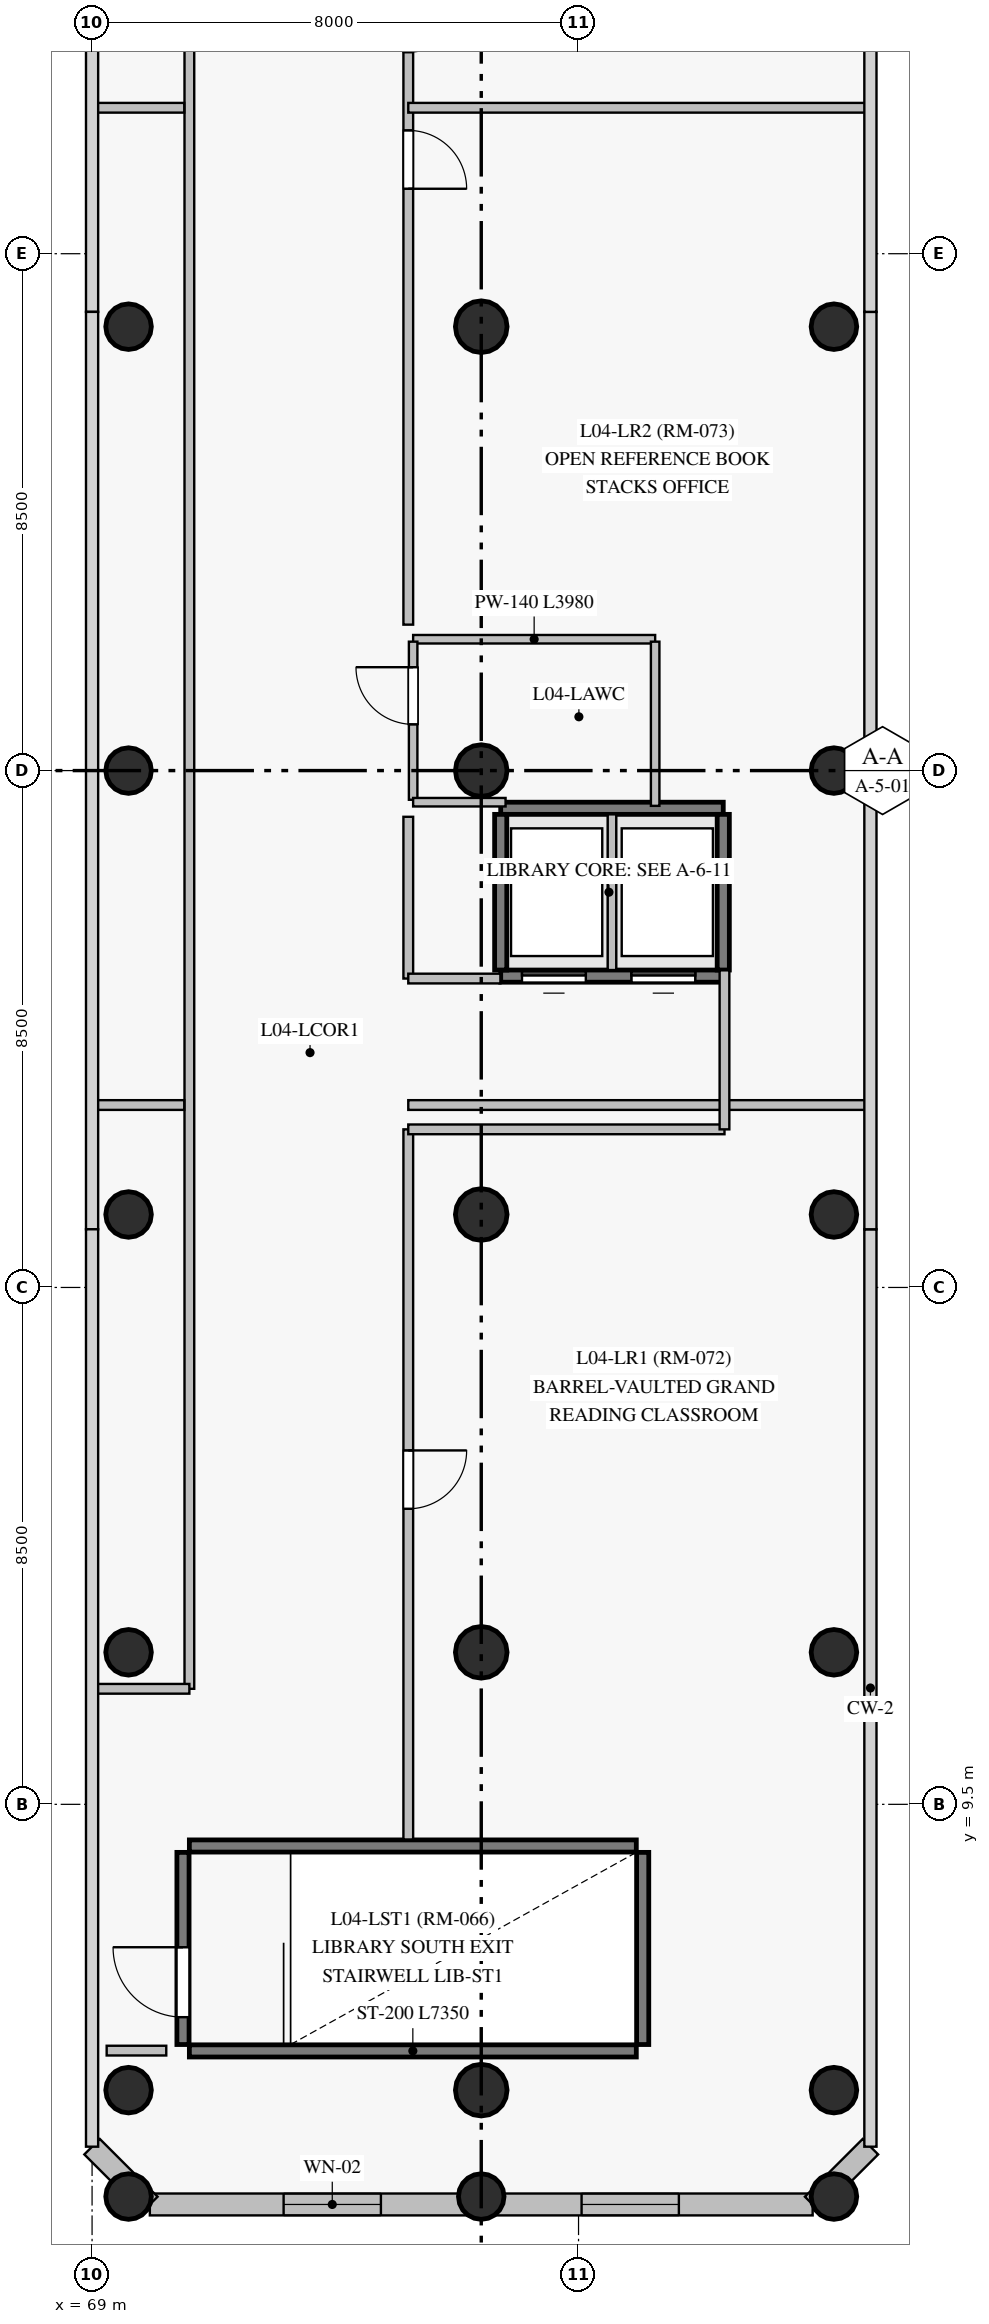
"""IFC4 building model, lengths in metres.
Left out: names, types, materials, properties, quantities, classifications, styles, units other than length and angle.
Written with IfcOpenShell. Run it as: python <this file> out.ifc"""

import sys

from ifc_helpers import new_model, si_unit, direction, frame, frame_2d, origin, origin_with_axes, origin_2d, place, context, subcontext, project, spatial, rectangle, circle, extrude, source, transform, mapped, element, fill, save


model = new_model("IFC4")
c1 = context("Model", 3, precision=1e-05, world=origin(), true_north=direction((0.0, 1.0)))
c2 = subcontext(c1, "Body", "Model", "MODEL_VIEW")
j1 = project(units=[si_unit("LENGTHUNIT", "METRE"), si_unit("PLANEANGLEUNIT", "RADIAN")], contexts=[c1])
p1 = place(None, origin())
s1 = spatial("IfcSite", under=j1, at=p1, CompositionType="ELEMENT")
p2 = place(p1, origin())
s2 = spatial("IfcBuilding", under=s1, at=p2, CompositionType="ELEMENT")
p3 = place(p2, frame((0.0, 0.0, 18.0)))
s3 = spatial("IfcBuildingStorey", under=s2, at=p3, CompositionType="ELEMENT", Elevation=18.0)
m1 = source(origin_with_axes(), c2, "Body", "SweptSolid", [
    extrude(circle(Radius=0.375, at=origin_2d()), origin(), (0.0, 0.0, 1.0), 4.225),
])
for number, where, z_axis, x_axis in (
    (1, (69.6, 3.05, 0.0), (0.0, 0.0, 1.0), (1.0, 0.0, 0.0)),
    (2, (75.4, 3.05, 0.0), (0.0, 0.0, 1.0), (1.0, 0.0, 0.0)),
    (3, (81.2, 3.05, 0.0), (0.0, 0.0, 1.0), (1.0, 0.0, 0.0)),
    (4, (69.6, 4.8, 0.0), (0.0, 0.0, 1.0), (1.0, 0.0, 0.0)),
    (5, (69.6, 12.0, 0.0), (0.0, 0.0, 1.0), (1.0, 0.0, 0.0)),
    (6, (69.6, 19.2, 0.0), (0.0, 0.0, 1.0), (1.0, 0.0, 0.0)),
    (7, (69.6, 26.5, 0.0), (0.0, 0.0, 1.0), (1.0, 0.0, 0.0)),
    (8, (69.6, 33.8, 0.0), (0.0, 0.0, 1.0), (1.0, 0.0, 0.0)),
):
    element("IfcColumn", number, at=place(p3, frame(where, z_axis=z_axis, x_axis=x_axis)), inside=s3, PredefinedType="COLUMN", context=c2, shape_type="MappedRepresentation", body=[
        mapped(m1, transform((0.0, 0.0, 0.0), scale=1.0)),
    ])
m2 = source(origin_with_axes(), c2, "Body", "SweptSolid", [
    extrude(circle(Radius=0.425, at=origin_2d()), origin(), (0.0, 0.0, 1.0), 4.225),
])
for number, where, z_axis, x_axis in (
    (9, (75.4, 4.8, 0.0), (0.0, 0.0, 1.0), (1.0, 0.0, 0.0)),
    (10, (75.4, 12.0, 0.0), (0.0, 0.0, 1.0), (1.0, 0.0, 0.0)),
    (11, (75.4, 19.2, 0.0), (0.0, 0.0, 1.0), (1.0, 0.0, 0.0)),
    (12, (75.4, 26.5, 0.0), (0.0, 0.0, 1.0), (1.0, 0.0, 0.0)),
    (13, (75.4, 33.8, 0.0), (0.0, 0.0, 1.0), (1.0, 0.0, 0.0)),
):
    element("IfcColumn", number, at=place(p3, frame(where, z_axis=z_axis, x_axis=x_axis)), inside=s3, PredefinedType="COLUMN", context=c2, shape_type="MappedRepresentation", body=[
        mapped(m2, transform((0.0, 0.0, 0.0), scale=1.0)),
    ])
for number, where, z_axis, x_axis in (
    (14, (81.2, 4.8, 0.0), (0.0, 0.0, 1.0), (1.0, 0.0, 0.0)),
    (15, (81.2, 12.0, 0.0), (0.0, 0.0, 1.0), (1.0, 0.0, 0.0)),
    (16, (81.2, 19.2, 0.0), (0.0, 0.0, 1.0), (1.0, 0.0, 0.0)),
    (17, (81.2, 26.5, 0.0), (0.0, 0.0, 1.0), (1.0, 0.0, 0.0)),
    (18, (81.2, 33.8, 0.0), (0.0, 0.0, 1.0), (1.0, 0.0, 0.0)),
):
    element("IfcColumn", number, at=place(p3, frame(where, z_axis=z_axis, x_axis=x_axis)), inside=s3, PredefinedType="COLUMN", context=c2, shape_type="MappedRepresentation", body=[
        mapped(m1, transform((0.0, 0.0, 0.0), scale=1.0)),
    ])
p4 = place(p3, frame((69.95, 2.92, 0.0), z_axis=(0.0, 0.0, 1.0), x_axis=(1.0, 0.0, 0.0)))
e19 = element("IfcWall", 19, at=p4, inside=s3, PredefinedType="SOLIDWALL", context=c2, shape_type="SweptSolid", body=[
    extrude(rectangle(XDim=10.9, YDim=0.36, at=frame_2d((5.45, 0.0))), origin(), (0.0, 0.0, 1.0), 4.225),
])
p5 = place(p4, frame((2.2, 0.0, 0.85)))
e20 = element("IfcOpeningElement", 20, at=p5, cuts=e19, PredefinedType="OPENING", context=c2, shape_type="SweptSolid", body=[
    extrude(rectangle(XDim=1.6, YDim=2.2, at=frame_2d((0.8, 1.1))), frame((0.0, 0.19, 0.0), z_axis=(0.0, -1.0, 0.0), x_axis=(1.0, 0.0, 0.0)), (0.0, 0.0, 1.0), 0.38),
])
p6 = place(p4, frame((7.1, 0.0, 0.85)))
e21 = element("IfcOpeningElement", 21, at=p6, cuts=e19, PredefinedType="OPENING", context=c2, shape_type="SweptSolid", body=[
    extrude(rectangle(XDim=1.6, YDim=2.2, at=frame_2d((0.8, 1.1))), frame((0.0, 0.19, 0.0), z_axis=(0.0, -1.0, 0.0), x_axis=(1.0, 0.0, 0.0)), (0.0, 0.0, 1.0), 0.38),
])
for number, where, z_axis, x_axis in (
    (22, (80.85, 2.92, 0.0), (0.0, 0.0, 1.0), (0.707, 0.707, 0.0)),
    (23, (69.0, 3.87, 0.0), (0.0, 0.0, 1.0), (0.707, -0.707, 0.0)),
):
    element("IfcWall", number, at=place(p3, frame(where, z_axis=z_axis, x_axis=x_axis)), inside=s3, PredefinedType="SOLIDWALL", context=c2, shape_type="SweptSolid", body=[
        extrude(rectangle(XDim=1.344, YDim=0.36, at=frame_2d((0.672, 0.0))), origin(), (0.0, 0.0, 1.0), 2.825),
    ])
for number, where, z_axis, x_axis in (
    (24, (70.6, 5.445, 0.0), (0.0, 0.0, 1.0), (1.0, 0.0, 0.0)),
    (25, (70.6, 8.815, 0.0), (0.0, 0.0, 1.0), (1.0, 0.0, 0.0)),
):
    element("IfcWall", number, at=place(p3, frame(where, z_axis=z_axis, x_axis=x_axis)), inside=s3, PredefinedType="SHEAR", context=c2, shape_type="SweptSolid", body=[
        extrude(rectangle(XDim=7.35, YDim=0.2, at=frame_2d((3.675, 0.0))), origin(), (0.0, 0.0, 1.0), 4.225),
    ])
p7 = place(p3, frame((75.72, 23.12, 0.0), z_axis=(0.0, 0.0, 1.0), x_axis=(1.0, 0.0, 0.0)))
e26 = element("IfcWall", 26, at=p7, inside=s3, PredefinedType="SHEAR", context=c2, shape_type="SweptSolid", body=[
    extrude(rectangle(XDim=3.66, YDim=0.2, at=frame_2d((1.83, 0.0))), origin(), (0.0, 0.0, 1.0), 4.225),
])
p8 = place(p7, frame((0.35, 0.0, 0.0)))
e27 = element("IfcOpeningElement", 27, at=p8, cuts=e26, PredefinedType="OPENING", context=c2, shape_type="SweptSolid", body=[
    extrude(rectangle(XDim=1.05, YDim=2.15, at=frame_2d((0.525, 1.075))), frame((0.0, 0.11, 0.0), z_axis=(0.0, -1.0, 0.0), x_axis=(1.0, 0.0, 0.0)), (0.0, 0.0, 1.0), 0.22),
])
p9 = place(p7, frame((2.15, 0.0, 0.0)))
e28 = element("IfcOpeningElement", 28, at=p9, cuts=e26, PredefinedType="OPENING", context=c2, shape_type="SweptSolid", body=[
    extrude(rectangle(XDim=1.05, YDim=2.15, at=frame_2d((0.525, 1.075))), frame((0.0, 0.11, 0.0), z_axis=(0.0, -1.0, 0.0), x_axis=(1.0, 0.0, 0.0)), (0.0, 0.0, 1.0), 0.22),
])
p10 = place(p3, frame((75.72, 25.88, 0.0), z_axis=(0.0, 0.0, 1.0), x_axis=(1.0, 0.0, 0.0)))
e29 = element("IfcWall", 29, at=p10, inside=s3, PredefinedType="SHEAR", context=c2, shape_type="SweptSolid", body=[
    extrude(rectangle(XDim=3.66, YDim=0.2, at=frame_2d((1.83, 0.0))), origin(), (0.0, 0.0, 1.0), 4.225),
])
p11 = place(p3, frame((70.495, 5.55, 0.0), z_axis=(0.0, 0.0, 1.0), x_axis=(0.0, 1.0, 0.0)))
e30 = element("IfcWall", 30, at=p11, inside=s3, PredefinedType="SHEAR", context=c2, shape_type="SweptSolid", body=[
    extrude(rectangle(XDim=3.16, YDim=0.2, at=frame_2d((1.58, 0.0))), origin(), (0.0, 0.0, 1.0), 4.225),
])
p12 = place(p11, frame((0.45, 0.0, 0.0)))
e31 = element("IfcOpeningElement", 31, at=p12, cuts=e30, PredefinedType="OPENING", context=c2, shape_type="SweptSolid", body=[
    extrude(rectangle(XDim=1.15, YDim=2.15, at=frame_2d((0.575, 1.075))), frame((0.0, 0.11, 0.0), z_axis=(0.0, -1.0, 0.0), x_axis=(1.0, 0.0, 0.0)), (0.0, 0.0, 1.0), 0.22),
])
p13 = place(p3, frame((78.055, 5.55, 0.0), z_axis=(0.0, 0.0, 1.0), x_axis=(0.0, 1.0, 0.0)))
e32 = element("IfcWall", 32, at=p13, inside=s3, PredefinedType="SHEAR", context=c2, shape_type="SweptSolid", body=[
    extrude(rectangle(XDim=3.16, YDim=0.2, at=frame_2d((1.58, 0.0))), origin(), (0.0, 0.0, 1.0), 4.225),
])
for number, where, z_axis, x_axis in (
    (33, (75.72, 23.22, 0.0), (0.0, 0.0, 1.0), (0.0, 1.0, 0.0)),
    (34, (79.38, 23.22, 0.0), (0.0, 0.0, 1.0), (0.0, 1.0, 0.0)),
):
    element("IfcWall", number, at=place(p3, frame(where, z_axis=z_axis, x_axis=x_axis)), inside=s3, PredefinedType="SHEAR", context=c2, shape_type="SweptSolid", body=[
        extrude(rectangle(XDim=2.56, YDim=0.2, at=frame_2d((1.28, 0.0))), origin(), (0.0, 0.0, 1.0), 4.225),
    ])
p14 = place(p3, frame((70.6, 11.4, 0.0), z_axis=(0.0, 0.0, 1.0), x_axis=(0.0, 1.0, 0.0)))
e35 = element("IfcWall", 35, at=p14, inside=s3, PredefinedType="PARTITIONING", context=c2, shape_type="SweptSolid", body=[
    extrude(rectangle(XDim=30.2, YDim=0.16, at=frame_2d((15.1, 0.0))), origin(), (0.0, 0.0, 1.0), 4.225),
])
p15 = place(p3, frame((74.2, 44.038, 0.0), z_axis=(0.0, 0.0, 1.0), x_axis=(0.0, -1.0, 0.0)))
e36 = element("IfcWall", 36, at=p15, inside=s3, PredefinedType="PARTITIONING", context=c2, shape_type="SweptSolid", body=[
    extrude(rectangle(XDim=15.138, YDim=0.16, at=frame_2d((7.569, 0.0))), origin(), (0.0, 0.0, 1.0), 4.225),
])
p16 = place(p15, frame((7.01, 0.0, 0.0)))
e37 = element("IfcOpeningElement", 37, at=p16, cuts=e36, PredefinedType="OPENING", context=c2, shape_type="SweptSolid", body=[
    extrude(rectangle(XDim=0.96, YDim=2.15, at=frame_2d((0.48, 1.075))), frame((0.0, 0.09, 0.0), z_axis=(0.0, -1.0, 0.0), x_axis=(1.0, 0.0, 0.0)), (0.0, 0.0, 1.0), 0.18),
])
p17 = place(p15, frame((4.764, 0.0, 0.0)))
e38 = element("IfcOpeningElement", 38, at=p17, cuts=e36, PredefinedType="OPENING", context=c2, shape_type="SweptSolid", body=[
    extrude(rectangle(XDim=0.96, YDim=2.15, at=frame_2d((0.48, 1.075))), frame((0.0, 0.09, 0.0), z_axis=(0.0, -1.0, 0.0), x_axis=(1.0, 0.0, 0.0)), (0.0, 0.0, 1.0), 0.18),
])
p18 = place(p3, frame((74.2, 20.6, 0.0), z_axis=(0.0, 0.0, 1.0), x_axis=(0.0, -1.0, 0.0)))
e39 = element("IfcWall", 39, at=p18, inside=s3, PredefinedType="PARTITIONING", context=c2, shape_type="SweptSolid", body=[
    extrude(rectangle(XDim=11.678, YDim=0.16, at=frame_2d((5.839, 0.0))), origin(), (0.0, 0.0, 1.0), 4.225),
])
p19 = place(p18, frame((5.28, 0.0, 0.0)))
e40 = element("IfcOpeningElement", 40, at=p19, cuts=e39, PredefinedType="OPENING", context=c2, shape_type="SweptSolid", body=[
    extrude(rectangle(XDim=0.96, YDim=2.15, at=frame_2d((0.48, 1.075))), frame((0.0, 0.09, 0.0), z_axis=(0.0, -1.0, 0.0), x_axis=(1.0, 0.0, 0.0)), (0.0, 0.0, 1.0), 0.18),
])
for number, where, z_axis, x_axis in (
    (41, (74.2, 21.0, 0.0), (0.0, 0.0, 1.0), (1.0, 0.0, 0.0)),
    (42, (74.2, 37.4, 0.0), (0.0, 0.0, 1.0), (1.0, 0.0, 0.0)),
):
    element("IfcWall", number, at=place(p3, frame(where, z_axis=z_axis, x_axis=x_axis)), inside=s3, PredefinedType="PARTITIONING", context=c2, shape_type="SweptSolid", body=[
        extrude(rectangle(XDim=7.545, YDim=0.16, at=frame_2d((3.772, 0.0))), origin(), (0.0, 0.0, 1.0), 4.225),
    ])
p20 = place(p3, frame((79.4, 20.6, 0.0), z_axis=(0.0, 0.0, 1.0), x_axis=(-1.0, 0.0, 0.0)))
e43 = element("IfcWall", 43, at=p20, inside=s3, PredefinedType="PARTITIONING", context=c2, shape_type="SweptSolid", body=[
    extrude(rectangle(XDim=5.2, YDim=0.16, at=frame_2d((2.6, 0.0))), origin(), (0.0, 0.0, 1.0), 4.225),
])
p21 = place(p3, frame((74.28, 28.66, 0.0), z_axis=(0.0, 0.0, 1.0), x_axis=(1.0, 0.0, 0.0)))
e44 = element("IfcWall", 44, at=p21, inside=s3, PredefinedType="PARTITIONING", context=c2, shape_type="SweptSolid", body=[
    extrude(rectangle(XDim=3.98, YDim=0.14, at=frame_2d((1.99, 0.0))), origin(), (0.0, 0.0, 1.0), 4.225),
])
p22 = place(p3, frame((78.26, 25.92, 0.0), z_axis=(0.0, 0.0, 1.0), x_axis=(0.0, 1.0, 0.0)))
e45 = element("IfcWall", 45, at=p22, inside=s3, PredefinedType="PARTITIONING", context=c2, shape_type="SweptSolid", body=[
    extrude(rectangle(XDim=2.7, YDim=0.14, at=frame_2d((1.35, 0.0))), origin(), (0.0, 0.0, 1.0), 4.225),
])
p23 = place(p3, frame((74.2, 25.74, 0.0), z_axis=(0.0, 0.0, 1.0), x_axis=(0.0, -1.0, 0.0)))
e46 = element("IfcWall", 46, at=p23, inside=s3, PredefinedType="PARTITIONING", context=c2, shape_type="SweptSolid", body=[
    extrude(rectangle(XDim=2.66, YDim=0.16, at=frame_2d((1.33, 0.0))), origin(), (0.0, 0.0, 1.0), 4.225),
])
p24 = place(p3, frame((74.28, 26.02, 0.0), z_axis=(0.0, 0.0, 1.0), x_axis=(0.0, 1.0, 0.0)))
e47 = element("IfcWall", 47, at=p24, inside=s3, PredefinedType="PARTITIONING", context=c2, shape_type="SweptSolid", body=[
    extrude(rectangle(XDim=2.6, YDim=0.14, at=frame_2d((1.3, 0.0))), origin(), (0.0, 0.0, 1.0), 4.225),
])
p25 = place(p24, frame((1.24, 0.0, 0.0)))
e48 = element("IfcOpeningElement", 48, at=p25, cuts=e47, PredefinedType="OPENING", context=c2, shape_type="SweptSolid", body=[
    extrude(rectangle(XDim=0.94, YDim=2.1, at=frame_2d((0.47, 1.05))), frame((0.0, 0.08, 0.0), z_axis=(0.0, -1.0, 0.0), x_axis=(1.0, 0.0, 0.0)), (0.0, 0.0, 1.0), 0.16),
])
p26 = place(p3, frame((77.55, 23.22, 0.0), z_axis=(0.0, 0.0, 1.0), x_axis=(0.0, 1.0, 0.0)))
e49 = element("IfcWall", 49, at=p26, inside=s3, PredefinedType="PARTITIONING", context=c2, shape_type="SweptSolid", body=[
    extrude(rectangle(XDim=2.56, YDim=0.14, at=frame_2d((1.28, 0.0))), origin(), (0.0, 0.0, 1.0), 4.225),
])
p27 = place(p3, frame((79.4, 23.215, 0.0), z_axis=(0.0, 0.0, 1.0), x_axis=(0.0, -1.0, 0.0)))
e50 = element("IfcWall", 50, at=p27, inside=s3, PredefinedType="PARTITIONING", context=c2, shape_type="SweptSolid", body=[
    extrude(rectangle(XDim=2.615, YDim=0.16, at=frame_2d((1.308, 0.0))), origin(), (0.0, 0.0, 1.0), 4.225),
])
p28 = place(p3, frame((74.28, 25.98, 0.0), z_axis=(0.0, 0.0, 1.0), x_axis=(1.0, 0.0, 0.0)))
e51 = element("IfcWall", 51, at=p28, inside=s3, PredefinedType="PARTITIONING", context=c2, shape_type="SweptSolid", body=[
    extrude(rectangle(XDim=1.52, YDim=0.14, at=frame_2d((0.76, 0.0))), origin(), (0.0, 0.0, 1.0), 4.225),
])
for number, where, z_axis, x_axis in (
    (52, (69.055, 21.0, 0.0), (0.0, 0.0, 1.0), (1.0, 0.0, 0.0)),
    (53, (69.055, 37.4, 0.0), (0.0, 0.0, 1.0), (1.0, 0.0, 0.0)),
):
    element("IfcWall", number, at=place(p3, frame(where, z_axis=z_axis, x_axis=x_axis)), inside=s3, PredefinedType="PARTITIONING", context=c2, shape_type="SweptSolid", body=[
        extrude(rectangle(XDim=1.461, YDim=0.16, at=frame_2d((0.73, 0.0))), origin(), (0.0, 0.0, 1.0), 4.225),
    ])
for number, where, z_axis, x_axis in (
    (54, (69.085, 11.4, 0.0), (0.0, 0.0, 1.0), (1.0, 0.0, 0.0)),
    (55, (74.2, 23.08, 0.0), (0.0, 0.0, 1.0), (1.0, 0.0, 0.0)),
):
    element("IfcWall", number, at=place(p3, frame(where, z_axis=z_axis, x_axis=x_axis)), inside=s3, PredefinedType="PARTITIONING", context=c2, shape_type="SweptSolid", body=[
        extrude(rectangle(XDim=1.515, YDim=0.16, at=frame_2d((0.758, 0.0))), origin(), (0.0, 0.0, 1.0), 4.225),
    ])
p29 = place(p3, frame((70.22, 5.45, 0.0), z_axis=(0.0, 0.0, 1.0), x_axis=(-1.0, 0.0, 0.0)))
e56 = element("IfcWall", 56, at=p29, inside=s3, PredefinedType="PARTITIONING", context=c2, shape_type="SweptSolid", body=[
    extrude(rectangle(XDim=0.98, YDim=0.16, at=frame_2d((0.49, 0.0))), origin(), (0.0, 0.0, 1.0), 3.575),
])
m3 = source(origin_with_axes(), c2, "Body", "SweptSolid", [
    extrude(rectangle(XDim=1.6, YDim=2.2, at=frame_2d((0.8, 1.1))), frame((0.0, 0.03, 0.0), z_axis=(0.0, -1.0, 0.0), x_axis=(1.0, 0.0, 0.0)), (0.0, 0.0, 1.0), 0.06),
])
p30 = place(p5, origin())
e57 = element("IfcWindow", 57, at=p30, inside=s3, PartitioningType="SINGLE_PANEL", PredefinedType="WINDOW", context=c2, shape_type="MappedRepresentation", body=[
    mapped(m3, transform((0.0, 0.0, 0.0), scale=1.0)),
])
fill(e20, e57)
p31 = place(p6, origin())
e58 = element("IfcWindow", 58, at=p31, inside=s3, PartitioningType="SINGLE_PANEL", PredefinedType="WINDOW", context=c2, shape_type="MappedRepresentation", body=[
    mapped(m3, transform((0.0, 0.0, 0.0), scale=1.0)),
])
fill(e21, e58)
m4 = source(origin_with_axes(), c2, "Body", "SweptSolid", [
    extrude(rectangle(XDim=1.15, YDim=2.15, at=frame_2d((0.575, 1.075))), frame((0.0, 0.025, 0.0), z_axis=(0.0, -1.0, 0.0), x_axis=(1.0, 0.0, 0.0)), (0.0, 0.0, 1.0), 0.05),
])
p32 = place(p12, origin())
e59 = element("IfcDoor", 59, at=p32, inside=s3, OperationType="SINGLE_SWING_RIGHT", PredefinedType="DOOR", context=c2, shape_type="MappedRepresentation", body=[
    mapped(m4, transform((0.0, 0.0, 0.0), scale=1.0)),
])
fill(e31, e59)
m5 = source(origin_with_axes(), c2, "Body", "SweptSolid", [
    extrude(rectangle(XDim=1.05, YDim=2.15, at=frame_2d((0.525, 1.075))), frame((0.0, 0.025, 0.0), z_axis=(0.0, -1.0, 0.0), x_axis=(1.0, 0.0, 0.0)), (0.0, 0.0, 1.0), 0.05),
])
p33 = place(p8, origin())
e60 = element("IfcDoor", 60, at=p33, inside=s3, OperationType="SLIDING_TO_LEFT", PredefinedType="DOOR", context=c2, shape_type="MappedRepresentation", body=[
    mapped(m5, transform((0.0, 0.0, 0.0), scale=1.0)),
])
fill(e27, e60)
p34 = place(p9, origin())
e61 = element("IfcDoor", 61, at=p34, inside=s3, OperationType="SLIDING_TO_RIGHT", PredefinedType="DOOR", context=c2, shape_type="MappedRepresentation", body=[
    mapped(m5, transform((0.0, 0.0, 0.0), scale=1.0)),
])
fill(e28, e61)
m6 = source(origin_with_axes(), c2, "Body", "SweptSolid", [
    extrude(rectangle(XDim=0.94, YDim=2.1, at=frame_2d((0.47, 1.05))), frame((0.0, 0.025, 0.0), z_axis=(0.0, -1.0, 0.0), x_axis=(1.0, 0.0, 0.0)), (0.0, 0.0, 1.0), 0.05),
])
p35 = place(p25, origin())
e62 = element("IfcDoor", 62, at=p35, inside=s3, OperationType="SINGLE_SWING_RIGHT", PredefinedType="DOOR", context=c2, shape_type="MappedRepresentation", body=[
    mapped(m6, transform((0.0, 0.0, 0.0), scale=1.0)),
])
fill(e48, e62)
m7 = source(origin_with_axes(), c2, "Body", "SweptSolid", [
    extrude(rectangle(XDim=0.96, YDim=2.15, at=frame_2d((0.48, 1.075))), frame((0.0, 0.025, 0.0), z_axis=(0.0, -1.0, 0.0), x_axis=(1.0, 0.0, 0.0)), (0.0, 0.0, 1.0), 0.05),
])
p36 = place(p19, origin())
e63 = element("IfcDoor", 63, at=p36, inside=s3, OperationType="SINGLE_SWING_LEFT", PredefinedType="DOOR", context=c2, shape_type="MappedRepresentation", body=[
    mapped(m7, transform((0.0, 0.0, 0.0), scale=1.0)),
])
fill(e40, e63)
p37 = place(p16, origin())
e64 = element("IfcDoor", 64, at=p37, inside=s3, OperationType="SINGLE_SWING_RIGHT", PredefinedType="DOOR", context=c2, shape_type="MappedRepresentation", body=[
    mapped(m7, transform((0.0, 0.0, 0.0), scale=1.0)),
])
fill(e37, e64)
p38 = place(p17, origin())
e65 = element("IfcDoor", 65, at=p38, inside=s3, OperationType="SINGLE_SWING_LEFT", PredefinedType="DOOR", context=c2, shape_type="MappedRepresentation", body=[
    mapped(m7, transform((0.0, 0.0, 0.0), scale=1.0)),
])
fill(e38, e65)
save(model, sys.argv[1])
